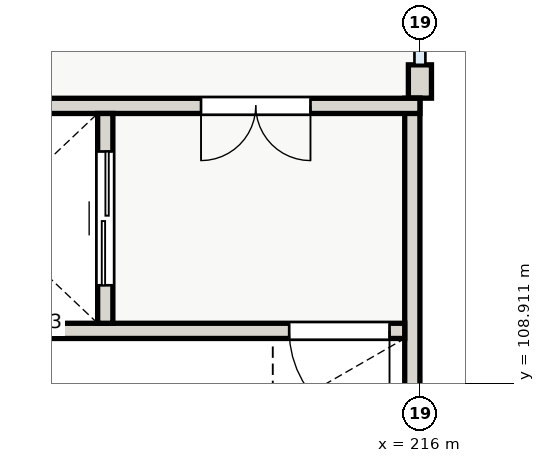
"""IFC4 building model, lengths in metres.
Left out: names, types, materials, properties, quantities, classifications, styles, units other than length and angle.
Written with IfcOpenShell. Run it as: python <this file> out.ifc"""

import sys

from ifc_helpers import new_model, si_unit, direction, frame, frame_2d, origin, place, context, subcontext, project, spatial, rectangle, extrude, element, fill, save


model = new_model("IFC4")
c1 = context("Model", 3, precision=1e-05, world=origin(), true_north=direction((0.0, 1.0)))
c2 = subcontext(c1, "Body", "Model", "MODEL_VIEW")
j1 = project(units=[si_unit("LENGTHUNIT", "METRE"), si_unit("PLANEANGLEUNIT", "RADIAN")], contexts=[c1])
p1 = place(None, origin())
s1 = spatial("IfcSite", under=j1, at=p1, CompositionType="ELEMENT")
p2 = place(p1, origin())
s2 = spatial("IfcBuilding", under=s1, at=p2, CompositionType="ELEMENT")
p3 = place(p2, frame((0.0, 0.0, 12.6)))
s3 = spatial("IfcBuildingStorey", under=s2, at=p3, CompositionType="ELEMENT", Elevation=12.6)
p4 = place(p3, frame((216.0, 114.15, 0.0), z_axis=(0.0, 0.0, 1.0), x_axis=(0.0, -1.0, 0.0)))
e1 = element("IfcWall", 1, at=p4, inside=s3, PredefinedType="SOLIDWALL", context=c2, shape_type="SweptSolid", body=[
    extrude(rectangle(XDim=0.548, YDim=0.38, at=frame_2d((0.274, 0.0))), origin(), (0.0, 0.0, 1.0), 3.35),
])
p5 = place(p3, frame((215.875, 113.6, 0.0), z_axis=(0.0, 0.0, 1.0), x_axis=(0.0, -1.0, 0.0)))
e2 = element("IfcWall", 2, at=p5, inside=s3, PredefinedType="SHEAR", context=c2, shape_type="SweptSolid", body=[
    extrude(rectangle(XDim=9.2, YDim=0.25, at=frame_2d((4.6, 0.0))), origin(), (0.0, 0.0, 1.0), 5.6),
])
p6 = place(p3, frame((216.0, 113.475, 0.0), z_axis=(0.0, 0.0, 1.0), x_axis=(-1.0, 0.0, 0.0)))
e3 = element("IfcWall", 3, at=p6, inside=s3, PredefinedType="SHEAR", context=c2, shape_type="SweptSolid", body=[
    extrude(rectangle(XDim=9.2, YDim=0.25, at=frame_2d((4.6, 0.0))), origin(), (0.0, 0.0, 1.0), 5.6),
])
p7 = place(p6, frame((1.8, 0.0, 0.0)))
e4 = element("IfcOpeningElement", 4, at=p7, cuts=e3, PredefinedType="OPENING", context=c2, shape_type="SweptSolid", body=[
    extrude(rectangle(XDim=1.8, YDim=2.15, at=frame_2d((0.9, 1.075))), frame((0.0, 0.135, 0.0), z_axis=(0.0, -1.0, 0.0), x_axis=(1.0, 0.0, 0.0)), (0.0, 0.0, 1.0), 0.27),
])
p8 = place(p3, frame((215.75, 109.775, 0.0), z_axis=(0.0, 0.0, 1.0), x_axis=(-1.0, 0.0, 0.0)))
e5 = element("IfcWall", 5, at=p8, inside=s3, PredefinedType="SHEAR", context=c2, shape_type="SweptSolid", body=[
    extrude(rectangle(XDim=8.7, YDim=0.25, at=frame_2d((4.35, 0.0))), origin(), (0.0, 0.0, 1.0), 5.6),
])
p9 = place(p8, frame((0.25, 0.0, 0.0)))
e6 = element("IfcOpeningElement", 6, at=p9, cuts=e5, PredefinedType="OPENING", context=c2, shape_type="SweptSolid", body=[
    extrude(rectangle(XDim=1.65, YDim=2.1, at=frame_2d((0.825, 1.05))), frame((0.0, 0.135, 0.0), z_axis=(0.0, -1.0, 0.0), x_axis=(1.0, 0.0, 0.0)), (0.0, 0.0, 1.0), 0.27),
])
p10 = place(p3, frame((210.825, 109.9, 0.0), z_axis=(0.0, 0.0, 1.0), x_axis=(0.0, 1.0, 0.0)))
e7 = element("IfcWall", 7, at=p10, inside=s3, PredefinedType="SHEAR", context=c2, shape_type="SweptSolid", body=[
    extrude(rectangle(XDim=3.45, YDim=0.25, at=frame_2d((1.725, 0.0))), origin(), (0.0, 0.0, 1.0), 5.6),
])
p11 = place(p10, frame((0.625, 0.0, 0.0)))
e8 = element("IfcOpeningElement", 8, at=p11, cuts=e7, PredefinedType="OPENING", context=c2, shape_type="SweptSolid", body=[
    extrude(rectangle(XDim=2.2, YDim=2.35, at=frame_2d((1.1, 1.175))), frame((0.0, 0.135, 0.0), z_axis=(0.0, -1.0, 0.0), x_axis=(1.0, 0.0, 0.0)), (0.0, 0.0, 1.0), 0.27),
])
p12 = place(p7, origin())
e9 = element("IfcDoor", 9, at=p12, inside=s3, OperationType="DOUBLE_DOOR_SINGLE_SWING", PredefinedType="DOOR", context=c2, shape_type="SweptSolid", body=[
    extrude(rectangle(XDim=1.8, YDim=2.15, at=frame_2d((0.9, 1.075))), frame((0.0, 0.025, 0.0), z_axis=(0.0, -1.0, 0.0), x_axis=(1.0, 0.0, 0.0)), (0.0, 0.0, 1.0), 0.05),
])
fill(e4, e9)
p13 = place(p9, origin())
e10 = element("IfcDoor", 10, at=p13, inside=s3, OperationType="SINGLE_SWING_LEFT", PredefinedType="DOOR", context=c2, shape_type="SweptSolid", body=[
    extrude(rectangle(XDim=1.65, YDim=2.1, at=frame_2d((0.825, 1.05))), frame((0.0, 0.025, 0.0), z_axis=(0.0, -1.0, 0.0), x_axis=(1.0, 0.0, 0.0)), (0.0, 0.0, 1.0), 0.05),
])
fill(e6, e10)
p14 = place(p11, origin())
e11 = element("IfcDoor", 11, at=p14, inside=s3, OperationType="SLIDING_TO_LEFT", PredefinedType="DOOR", context=c2, shape_type="SweptSolid", body=[
    extrude(rectangle(XDim=2.2, YDim=2.35, at=frame_2d((1.1, 1.175))), frame((0.0, 0.025, 0.0), z_axis=(0.0, -1.0, 0.0), x_axis=(1.0, 0.0, 0.0)), (0.0, 0.0, 1.0), 0.05),
])
fill(e8, e11)
save(model, sys.argv[1])
